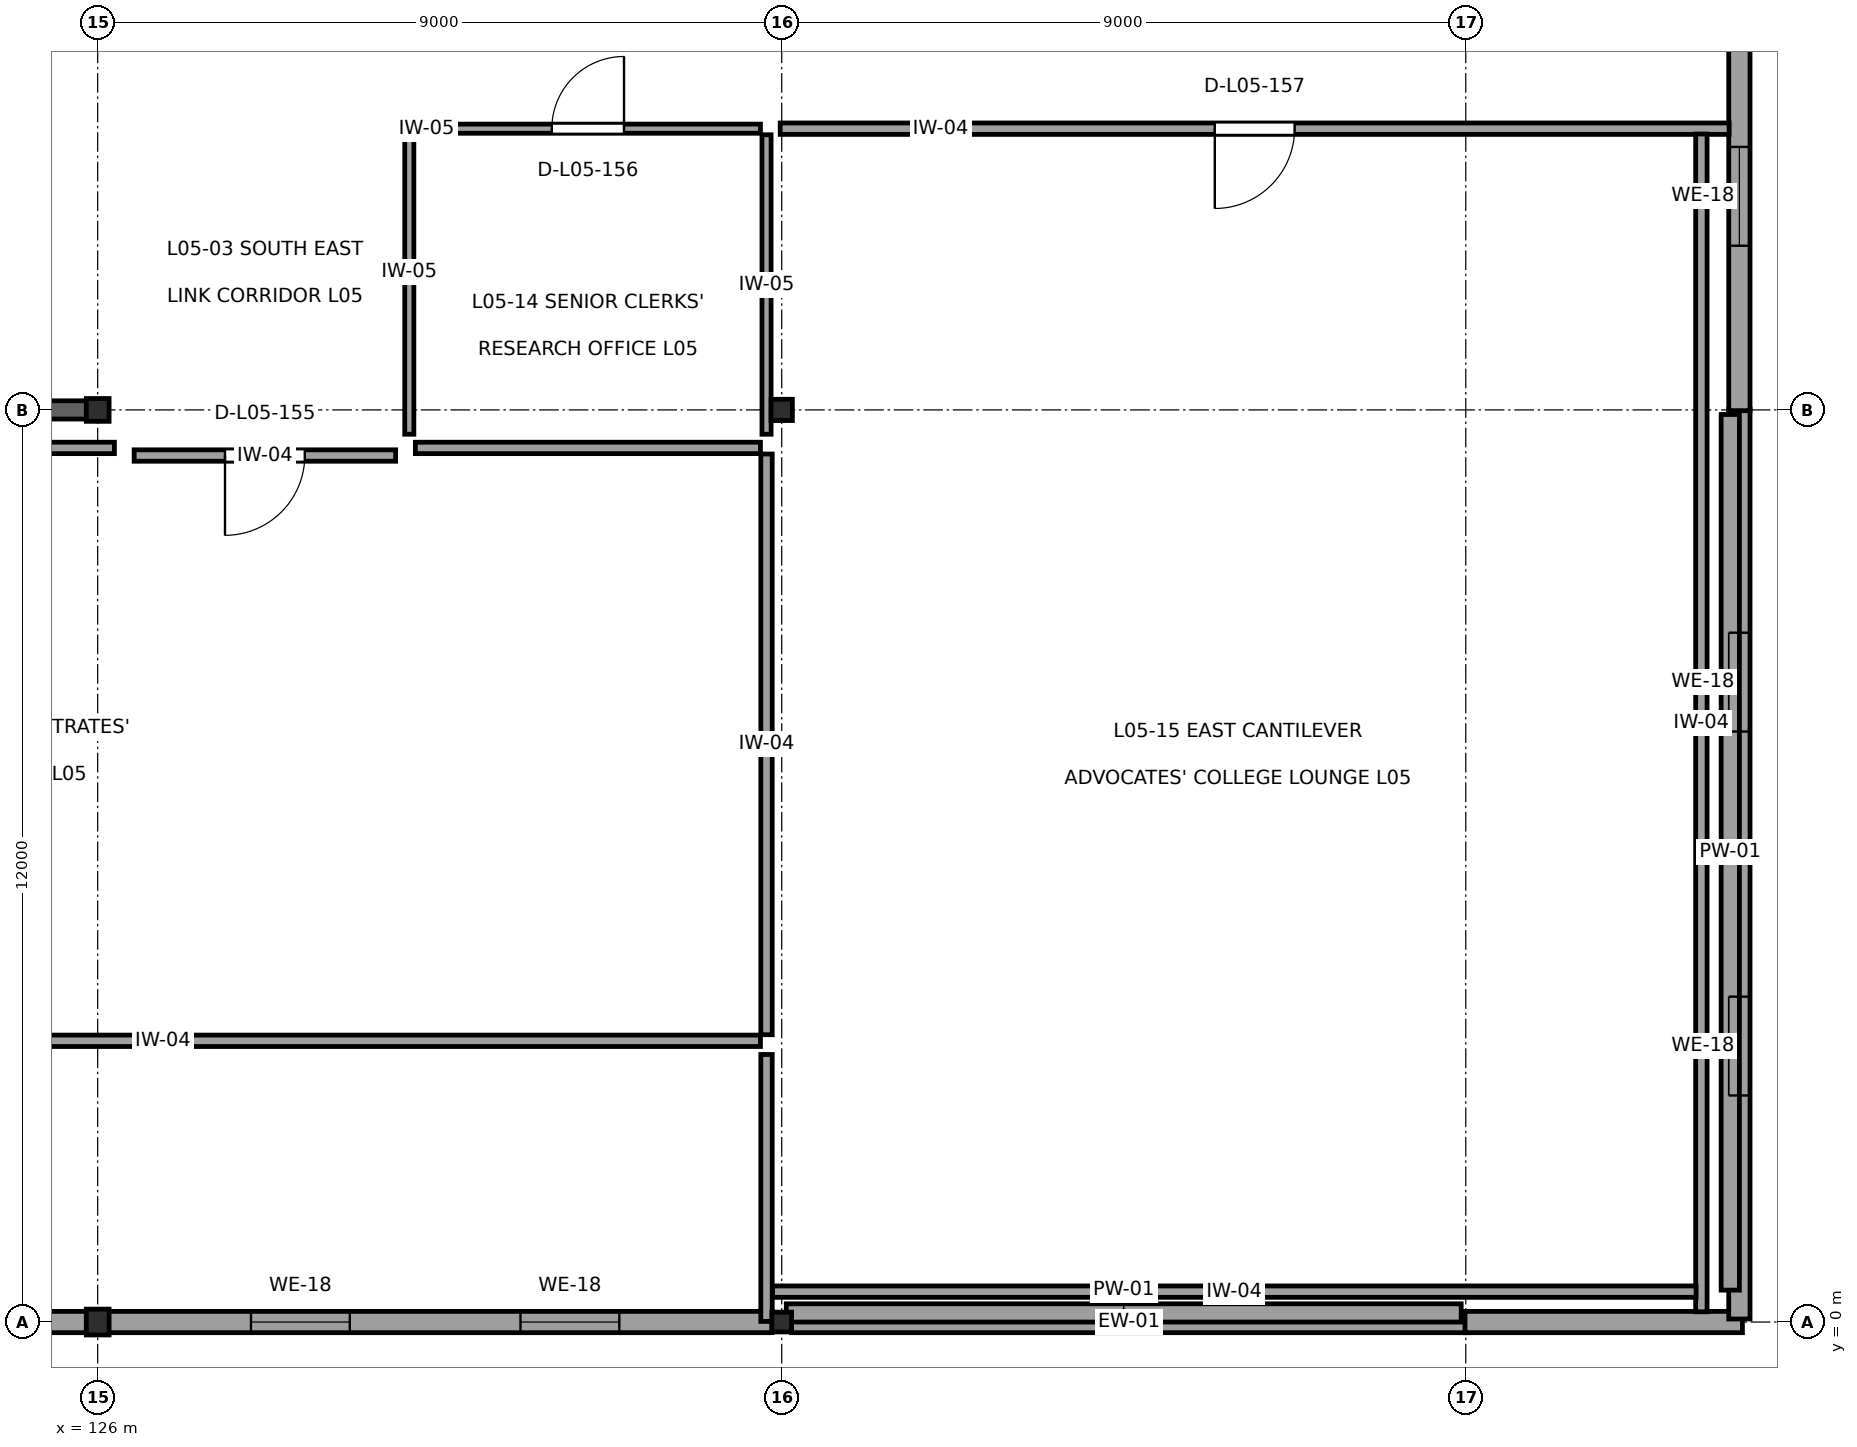
"""IFC4 building model, lengths in metres.
Left out: names, types, materials, properties, quantities, classifications, styles, units other than length and angle.
Written with IfcOpenShell. Run it as: python <this file> out.ifc"""

import sys

from ifc_helpers import new_model, si_unit, direction, frame, frame_2d, origin, origin_2d, place, context, subcontext, project, spatial, rectangle, i_section, extrude, element, fill, save


model = new_model("IFC4")
c1 = context("Model", 3, precision=1e-05, world=origin(), true_north=direction((0.0, 1.0)))
c2 = subcontext(c1, "Body", "Model", "MODEL_VIEW")
j1 = project(units=[si_unit("LENGTHUNIT", "METRE"), si_unit("PLANEANGLEUNIT", "RADIAN")], contexts=[c1])
p1 = place(None, origin())
s1 = spatial("IfcSite", under=j1, at=p1, CompositionType="ELEMENT")
p2 = place(p1, origin())
s2 = spatial("IfcBuilding", under=s1, at=p2, CompositionType="ELEMENT")
p3 = place(p2, frame((0.0, 0.0, 23.4)))
s3 = spatial("IfcBuildingStorey", under=s2, at=p3, CompositionType="ELEMENT", Elevation=23.4)
p4 = place(p3, frame((126.0, 0.0, 0.0), z_axis=(0.0, 0.0, 1.0), x_axis=(1.0, 0.0, 0.0)))
e1 = element("IfcColumn", 1, at=p4, inside=s3, PredefinedType="COLUMN", context=c2, shape_type="SweptSolid", body=[
    extrude(i_section(OverallWidth=0.3, OverallDepth=0.34, WebThickness=0.012, FlangeThickness=0.021, at=origin_2d()), origin(), (0.0, 0.0, 1.0), 4.0),
])
p5 = place(p3, frame((126.0, 12.0, 0.0), z_axis=(0.0, 0.0, 1.0), x_axis=(1.0, 0.0, 0.0)))
e2 = element("IfcColumn", 2, at=p5, inside=s3, PredefinedType="COLUMN", context=c2, shape_type="SweptSolid", body=[
    extrude(i_section(OverallWidth=0.3, OverallDepth=0.3, WebThickness=0.011, FlangeThickness=0.019, at=origin_2d()), origin(), (0.0, 0.0, 1.0), 4.0),
])
p6 = place(p3, frame((135.0, 0.0, 0.0), z_axis=(0.0, 0.0, 1.0), x_axis=(0.0, 1.0, 0.0)))
e3 = element("IfcColumn", 3, at=p6, inside=s3, PredefinedType="COLUMN", context=c2, shape_type="SweptSolid", body=[
    extrude(i_section(OverallWidth=0.26, OverallDepth=0.26, WebThickness=0.01, FlangeThickness=0.018, at=origin_2d()), origin(), (0.0, 0.0, 1.0), 4.0),
])
p7 = place(p3, frame((135.0, 12.0, 0.0), z_axis=(0.0, 0.0, 1.0), x_axis=(1.0, 0.0, 0.0)))
e4 = element("IfcColumn", 4, at=p7, inside=s3, PredefinedType="COLUMN", context=c2, shape_type="SweptSolid", body=[
    extrude(i_section(OverallWidth=0.28, OverallDepth=0.28, WebThickness=0.01, FlangeThickness=0.018, at=origin_2d()), origin(), (0.0, 0.0, 1.0), 4.0),
])
p8 = place(p3, frame((117.008, 0.0, 0.0), z_axis=(0.0, 0.0, 1.0), x_axis=(1.0, 0.0, 0.0)))
e5 = element("IfcWall", 5, at=p8, inside=s3, PredefinedType="SOLIDWALL", context=c2, shape_type="SweptSolid", body=[
    extrude(rectangle(XDim=8.984, YDim=0.28, at=frame_2d((4.492, 0.0))), origin(), (0.0, 0.0, 1.0), 2.747),
])
p9 = place(p8, frame((2.045, 0.0, 0.9)))
e6 = element("IfcOpeningElement", 6, at=p9, cuts=e5, PredefinedType="OPENING", context=c2, shape_type="SweptSolid", body=[
    extrude(rectangle(XDim=1.3, YDim=1.3, at=frame_2d((0.65, 0.65))), frame((0.0, 0.155, 0.0), z_axis=(0.0, -1.0, 0.0), x_axis=(1.0, 0.0, 0.0)), (0.0, 0.0, 1.0), 0.31),
])
p10 = place(p8, frame((5.639, 0.0, 0.9)))
e7 = element("IfcOpeningElement", 7, at=p10, cuts=e5, PredefinedType="OPENING", context=c2, shape_type="SweptSolid", body=[
    extrude(rectangle(XDim=1.3, YDim=1.3, at=frame_2d((0.65, 0.65))), frame((0.0, 0.155, 0.0), z_axis=(0.0, -1.0, 0.0), x_axis=(1.0, 0.0, 0.0)), (0.0, 0.0, 1.0), 0.31),
])
p11 = place(p3, frame((126.008, 0.0, 0.0), z_axis=(0.0, 0.0, 1.0), x_axis=(1.0, 0.0, 0.0)))
e8 = element("IfcWall", 8, at=p11, inside=s3, PredefinedType="SOLIDWALL", context=c2, shape_type="SweptSolid", body=[
    extrude(rectangle(XDim=8.864, YDim=0.28, at=frame_2d((4.432, 0.0))), origin(), (0.0, 0.0, 1.0), 2.747),
])
p12 = place(p11, frame((2.009, 0.0, 0.9)))
e9 = element("IfcOpeningElement", 9, at=p12, cuts=e8, PredefinedType="OPENING", context=c2, shape_type="SweptSolid", body=[
    extrude(rectangle(XDim=1.3, YDim=1.3, at=frame_2d((0.65, 0.65))), frame((0.0, 0.155, 0.0), z_axis=(0.0, -1.0, 0.0), x_axis=(1.0, 0.0, 0.0)), (0.0, 0.0, 1.0), 0.31),
])
p13 = place(p11, frame((5.555, 0.0, 0.9)))
e10 = element("IfcOpeningElement", 10, at=p13, cuts=e8, PredefinedType="OPENING", context=c2, shape_type="SweptSolid", body=[
    extrude(rectangle(XDim=1.3, YDim=1.3, at=frame_2d((0.65, 0.65))), frame((0.0, 0.155, 0.0), z_axis=(0.0, -1.0, 0.0), x_axis=(1.0, 0.0, 0.0)), (0.0, 0.0, 1.0), 0.31),
])
p14 = place(p3, frame((135.128, 0.0, 0.0), z_axis=(0.0, 0.0, 1.0), x_axis=(1.0, 0.0, 0.0)))
e11 = element("IfcWall", 11, at=p14, inside=s3, PredefinedType="SOLIDWALL", context=c2, shape_type="SweptSolid", body=[
    extrude(rectangle(XDim=8.882, YDim=0.28, at=frame_2d((4.441, 0.0))), origin(), (0.0, 0.0, 1.0), 2.747),
])
p15 = place(p3, frame((143.99, 0.0, 0.0), z_axis=(0.0, 0.0, 1.0), x_axis=(1.0, 0.0, 0.0)))
e12 = element("IfcWall", 12, at=p15, inside=s3, PredefinedType="SOLIDWALL", context=c2, shape_type="SweptSolid", body=[
    extrude(rectangle(XDim=3.65, YDim=0.28, at=frame_2d((1.825, 0.0))), origin(), (0.0, 0.0, 1.0), 2.747),
])
p16 = place(p3, frame((147.6, 0.04, 0.0), z_axis=(0.0, 0.0, 1.0), x_axis=(0.0, 1.0, 0.0)))
e13 = element("IfcWall", 13, at=p16, inside=s3, PredefinedType="SOLIDWALL", context=c2, shape_type="SweptSolid", body=[
    extrude(rectangle(XDim=11.97, YDim=0.28, at=frame_2d((5.985, 0.0))), origin(), (0.0, 0.0, 1.0), 3.055),
])
p17 = place(p16, frame((2.941, 0.0, 0.9)))
e14 = element("IfcOpeningElement", 14, at=p17, cuts=e13, PredefinedType="OPENING", context=c2, shape_type="SweptSolid", body=[
    extrude(rectangle(XDim=1.3, YDim=1.3, at=frame_2d((0.65, 0.65))), frame((0.0, 0.155, 0.0), z_axis=(0.0, -1.0, 0.0), x_axis=(1.0, 0.0, 0.0)), (0.0, 0.0, 1.0), 0.31),
])
p18 = place(p16, frame((7.729, 0.0, 0.9)))
e15 = element("IfcOpeningElement", 15, at=p18, cuts=e13, PredefinedType="OPENING", context=c2, shape_type="SweptSolid", body=[
    extrude(rectangle(XDim=1.3, YDim=1.3, at=frame_2d((0.65, 0.65))), frame((0.0, 0.155, 0.0), z_axis=(0.0, -1.0, 0.0), x_axis=(1.0, 0.0, 0.0)), (0.0, 0.0, 1.0), 0.31),
])
p19 = place(p3, frame((147.6, 11.99, 0.0), z_axis=(0.0, 0.0, 1.0), x_axis=(0.0, 1.0, 0.0)))
e16 = element("IfcWall", 16, at=p19, inside=s3, PredefinedType="SOLIDWALL", context=c2, shape_type="SweptSolid", body=[
    extrude(rectangle(XDim=12.05, YDim=0.28, at=frame_2d((6.025, 0.0))), origin(), (0.0, 0.0, 1.0), 3.055),
])
p20 = place(p19, frame((2.17, 0.0, 0.9)))
e17 = element("IfcOpeningElement", 17, at=p20, cuts=e16, PredefinedType="OPENING", context=c2, shape_type="SweptSolid", body=[
    extrude(rectangle(XDim=1.3, YDim=1.3, at=frame_2d((0.65, 0.65))), frame((0.0, 0.155, 0.0), z_axis=(0.0, -1.0, 0.0), x_axis=(1.0, 0.0, 0.0)), (0.0, 0.0, 1.0), 0.31),
])
p21 = place(p19, frame((7.785, 0.0, 0.9)))
e18 = element("IfcOpeningElement", 18, at=p21, cuts=e16, PredefinedType="OPENING", context=c2, shape_type="SweptSolid", body=[
    extrude(rectangle(XDim=1.3, YDim=1.3, at=frame_2d((0.65, 0.65))), frame((0.0, 0.155, 0.0), z_axis=(0.0, -1.0, 0.0), x_axis=(1.0, 0.0, 0.0)), (0.0, 0.0, 1.0), 0.31),
])
p22 = place(p3, frame((135.06, 0.12, 3.78), z_axis=(0.0, 0.0, 1.0), x_axis=(1.0, 0.0, 0.0)))
e19 = element("IfcWall", 19, at=p22, inside=s3, PredefinedType="PARAPET", context=c2, shape_type="SweptSolid", body=[
    extrude(rectangle(XDim=8.88, YDim=0.24, at=frame_2d((4.44, 0.0))), origin(), (0.0, 0.0, 1.0), 0.77),
])
p23 = place(p3, frame((147.48, 0.42, 3.78), z_axis=(0.0, 0.0, 1.0), x_axis=(0.0, 1.0, 0.0)))
e20 = element("IfcWall", 20, at=p23, inside=s3, PredefinedType="PARAPET", context=c2, shape_type="SweptSolid", body=[
    extrude(rectangle(XDim=11.52, YDim=0.24, at=frame_2d((5.76, 0.0))), origin(), (0.0, 0.0, 1.0), 0.77),
])
p24 = place(p3, frame((117.168, 12.0, 0.0), z_axis=(0.0, 0.0, 1.0), x_axis=(1.0, 0.0, 0.0)))
e21 = element("IfcWall", 21, at=p24, inside=s3, PredefinedType="SHEAR", context=c2, shape_type="SweptSolid", body=[
    extrude(rectangle(XDim=8.824, YDim=0.24, at=frame_2d((4.412, 0.0))), origin(), (0.0, 0.0, 1.0), 2.845),
])
p25 = place(p3, frame((126.48, 11.4, 0.0), z_axis=(0.0, 0.0, 1.0), x_axis=(1.0, 0.0, 0.0)))
e22 = element("IfcWall", 22, at=p25, inside=s3, PredefinedType="PARTITIONING", context=c2, shape_type="SweptSolid", body=[
    extrude(rectangle(XDim=3.44, YDim=0.15, at=frame_2d((1.72, 0.0))), origin(), (0.0, 0.0, 1.0), 3.64),
])
p26 = place(p25, frame((1.195, 0.0, 0.0)))
e23 = element("IfcOpeningElement", 23, at=p26, cuts=e22, PredefinedType="OPENING", context=c2, shape_type="SweptSolid", body=[
    extrude(rectangle(XDim=1.05, YDim=2.25, at=frame_2d((0.525, 1.125))), frame((0.0, 0.09, 0.0), z_axis=(0.0, -1.0, 0.0), x_axis=(1.0, 0.0, 0.0)), (0.0, 0.0, 1.0), 0.18),
])
p27 = place(p3, frame((130.18, 11.5, 0.0), z_axis=(0.0, 0.0, 1.0), x_axis=(1.0, 0.0, 0.0)))
e24 = element("IfcWall", 24, at=p27, inside=s3, PredefinedType="PARTITIONING", context=c2, shape_type="SweptSolid", body=[
    extrude(rectangle(XDim=4.54, YDim=0.15, at=frame_2d((2.27, 0.0))), origin(), (0.0, 0.0, 1.0), 3.64),
])
p28 = place(p3, frame((134.8, 11.42, 0.0), z_axis=(0.0, 0.0, 1.0), x_axis=(0.0, -1.0, 0.0)))
e25 = element("IfcWall", 25, at=p28, inside=s3, PredefinedType="PARTITIONING", context=c2, shape_type="SweptSolid", body=[
    extrude(rectangle(XDim=7.64, YDim=0.15, at=frame_2d((3.82, 0.0))), origin(), (0.0, 0.0, 1.0), 3.285),
])
p29 = place(p3, frame((134.72, 3.7, 0.0), z_axis=(0.0, 0.0, 1.0), x_axis=(-1.0, 0.0, 0.0)))
e26 = element("IfcWall", 26, at=p29, inside=s3, PredefinedType="PARTITIONING", context=c2, shape_type="SweptSolid", body=[
    extrude(rectangle(XDim=17.44, YDim=0.15, at=frame_2d((8.72, 0.0))), origin(), (0.0, 0.0, 1.0), 3.64),
])
p30 = place(p3, frame((116.795, 11.5, 0.0), z_axis=(0.0, 0.0, 1.0), x_axis=(1.0, 0.0, 0.0)))
e27 = element("IfcWall", 27, at=p30, inside=s3, PredefinedType="PARTITIONING", context=c2, shape_type="SweptSolid", body=[
    extrude(rectangle(XDim=9.425, YDim=0.15, at=frame_2d((4.712, 0.0))), origin(), (0.0, 0.0, 1.0), 3.64),
])
p31 = place(p3, frame((134.8, 15.62, 0.0), z_axis=(0.0, 0.0, 1.0), x_axis=(0.0, -1.0, 0.0)))
e28 = element("IfcWall", 28, at=p31, inside=s3, PredefinedType="PARTITIONING", context=c2, shape_type="SweptSolid", body=[
    extrude(rectangle(XDim=3.94, YDim=0.12, at=frame_2d((1.97, 0.0))), origin(), (0.0, 0.0, 1.0), 3.285),
])
p32 = place(p3, frame((130.1, 11.68, 0.0), z_axis=(0.0, 0.0, 1.0), x_axis=(0.0, 1.0, 0.0)))
e29 = element("IfcWall", 29, at=p32, inside=s3, PredefinedType="PARTITIONING", context=c2, shape_type="SweptSolid", body=[
    extrude(rectangle(XDim=3.94, YDim=0.12, at=frame_2d((1.97, 0.0))), origin(), (0.0, 0.0, 1.0), 3.64),
])
p33 = place(p3, frame((130.18, 15.7, 0.0), z_axis=(0.0, 0.0, 1.0), x_axis=(1.0, 0.0, 0.0)))
e30 = element("IfcWall", 30, at=p33, inside=s3, PredefinedType="PARTITIONING", context=c2, shape_type="SweptSolid", body=[
    extrude(rectangle(XDim=4.54, YDim=0.12, at=frame_2d((2.27, 0.0))), origin(), (0.0, 0.0, 1.0), 3.64),
])
p34 = place(p33, frame((1.795, 0.0, 0.0)))
e31 = element("IfcOpeningElement", 31, at=p34, cuts=e30, PredefinedType="OPENING", context=c2, shape_type="SweptSolid", body=[
    extrude(rectangle(XDim=0.95, YDim=2.15, at=frame_2d((0.475, 1.075))), frame((0.0, 0.075, 0.0), z_axis=(0.0, -1.0, 0.0), x_axis=(1.0, 0.0, 0.0)), (0.0, 0.0, 1.0), 0.15),
])
p35 = place(p3, frame((134.98, 15.7, 0.0), z_axis=(0.0, 0.0, 1.0), x_axis=(1.0, 0.0, 0.0)))
e32 = element("IfcWall", 32, at=p35, inside=s3, PredefinedType="PARTITIONING", context=c2, shape_type="SweptSolid", body=[
    extrude(rectangle(XDim=12.485, YDim=0.15, at=frame_2d((6.243, 0.0))), origin(), (0.0, 0.0, 1.0), 3.64),
])
p36 = place(p35, frame((5.718, 0.0, 0.0)))
e33 = element("IfcOpeningElement", 33, at=p36, cuts=e32, PredefinedType="OPENING", context=c2, shape_type="SweptSolid", body=[
    extrude(rectangle(XDim=1.05, YDim=2.25, at=frame_2d((0.525, 1.125))), frame((0.0, 0.09, 0.0), z_axis=(0.0, -1.0, 0.0), x_axis=(1.0, 0.0, 0.0)), (0.0, 0.0, 1.0), 0.18),
])
p37 = place(p3, frame((147.1, 15.63, 0.0), z_axis=(0.0, 0.0, 1.0), x_axis=(0.0, -1.0, 0.0)))
e34 = element("IfcWall", 34, at=p37, inside=s3, PredefinedType="PARTITIONING", context=c2, shape_type="SweptSolid", body=[
    extrude(rectangle(XDim=15.495, YDim=0.15, at=frame_2d((7.748, 0.0))), origin(), (0.0, 0.0, 1.0), 3.64),
])
p38 = place(p3, frame((147.03, 0.4, 0.0), z_axis=(0.0, 0.0, 1.0), x_axis=(-1.0, 0.0, 0.0)))
e35 = element("IfcWall", 35, at=p38, inside=s3, PredefinedType="PARTITIONING", context=c2, shape_type="SweptSolid", body=[
    extrude(rectangle(XDim=12.15, YDim=0.15, at=frame_2d((6.075, 0.0))), origin(), (0.0, 0.0, 1.0), 3.64),
])
p39 = place(p3, frame((134.8, 0.008, 0.0), z_axis=(0.0, 0.0, 1.0), x_axis=(0.0, 1.0, 0.0)))
e36 = element("IfcWall", 36, at=p39, inside=s3, PredefinedType="PARTITIONING", context=c2, shape_type="SweptSolid", body=[
    extrude(rectangle(XDim=3.512, YDim=0.15, at=frame_2d((1.756, 0.0))), origin(), (0.0, 0.0, 1.0), 3.285),
])
p40 = place(p12, origin())
e37 = element("IfcWindow", 37, at=p40, inside=s3, PartitioningType="SINGLE_PANEL", PredefinedType="WINDOW", context=c2, shape_type="SweptSolid", body=[
    extrude(rectangle(XDim=1.3, YDim=1.3, at=frame_2d((0.65, 0.65))), frame((0.0, 0.03, 0.0), z_axis=(0.0, -1.0, 0.0), x_axis=(1.0, 0.0, 0.0)), (0.0, 0.0, 1.0), 0.06),
])
fill(e9, e37)
p41 = place(p13, origin())
e38 = element("IfcWindow", 38, at=p41, inside=s3, PartitioningType="SINGLE_PANEL", PredefinedType="WINDOW", context=c2, shape_type="SweptSolid", body=[
    extrude(rectangle(XDim=1.3, YDim=1.3, at=frame_2d((0.65, 0.65))), frame((0.0, 0.03, 0.0), z_axis=(0.0, -1.0, 0.0), x_axis=(1.0, 0.0, 0.0)), (0.0, 0.0, 1.0), 0.06),
])
fill(e10, e38)
p42 = place(p17, origin())
e39 = element("IfcWindow", 39, at=p42, inside=s3, PartitioningType="SINGLE_PANEL", PredefinedType="WINDOW", context=c2, shape_type="SweptSolid", body=[
    extrude(rectangle(XDim=1.3, YDim=1.3, at=frame_2d((0.65, 0.65))), frame((0.0, 0.03, 0.0), z_axis=(0.0, -1.0, 0.0), x_axis=(1.0, 0.0, 0.0)), (0.0, 0.0, 1.0), 0.06),
])
fill(e14, e39)
p43 = place(p18, origin())
e40 = element("IfcWindow", 40, at=p43, inside=s3, PartitioningType="SINGLE_PANEL", PredefinedType="WINDOW", context=c2, shape_type="SweptSolid", body=[
    extrude(rectangle(XDim=1.3, YDim=1.3, at=frame_2d((0.65, 0.65))), frame((0.0, 0.03, 0.0), z_axis=(0.0, -1.0, 0.0), x_axis=(1.0, 0.0, 0.0)), (0.0, 0.0, 1.0), 0.06),
])
fill(e15, e40)
p44 = place(p20, origin())
e41 = element("IfcWindow", 41, at=p44, inside=s3, PartitioningType="SINGLE_PANEL", PredefinedType="WINDOW", context=c2, shape_type="SweptSolid", body=[
    extrude(rectangle(XDim=1.3, YDim=1.3, at=frame_2d((0.65, 0.65))), frame((0.0, 0.03, 0.0), z_axis=(0.0, -1.0, 0.0), x_axis=(1.0, 0.0, 0.0)), (0.0, 0.0, 1.0), 0.06),
])
fill(e17, e41)
p45 = place(p26, frame((1.05, 0.0, 0.0), z_axis=(0.0, 0.0, 1.0), x_axis=(-1.0, 0.0, 0.0)))
e42 = element("IfcDoor", 42, at=p45, inside=s3, OperationType="SINGLE_SWING_LEFT", PredefinedType="DOOR", context=c2, shape_type="SweptSolid", body=[
    extrude(rectangle(XDim=1.05, YDim=2.25, at=frame_2d((0.525, 1.125))), frame((0.0, 0.025, 0.0), z_axis=(0.0, -1.0, 0.0), x_axis=(1.0, 0.0, 0.0)), (0.0, 0.0, 1.0), 0.05),
])
fill(e23, e42)
p46 = place(p34, origin())
e43 = element("IfcDoor", 43, at=p46, inside=s3, OperationType="SINGLE_SWING_RIGHT", PredefinedType="DOOR", context=c2, shape_type="SweptSolid", body=[
    extrude(rectangle(XDim=0.95, YDim=2.15, at=frame_2d((0.475, 1.075))), frame((0.0, 0.025, 0.0), z_axis=(0.0, -1.0, 0.0), x_axis=(1.0, 0.0, 0.0)), (0.0, 0.0, 1.0), 0.05),
])
fill(e31, e43)
p47 = place(p36, frame((1.05, 0.0, 0.0), z_axis=(0.0, 0.0, 1.0), x_axis=(-1.0, 0.0, 0.0)))
e44 = element("IfcDoor", 44, at=p47, inside=s3, OperationType="SINGLE_SWING_LEFT", PredefinedType="DOOR", context=c2, shape_type="SweptSolid", body=[
    extrude(rectangle(XDim=1.05, YDim=2.25, at=frame_2d((0.525, 1.125))), frame((0.0, 0.025, 0.0), z_axis=(0.0, -1.0, 0.0), x_axis=(1.0, 0.0, 0.0)), (0.0, 0.0, 1.0), 0.05),
])
fill(e33, e44)
save(model, sys.argv[1])
